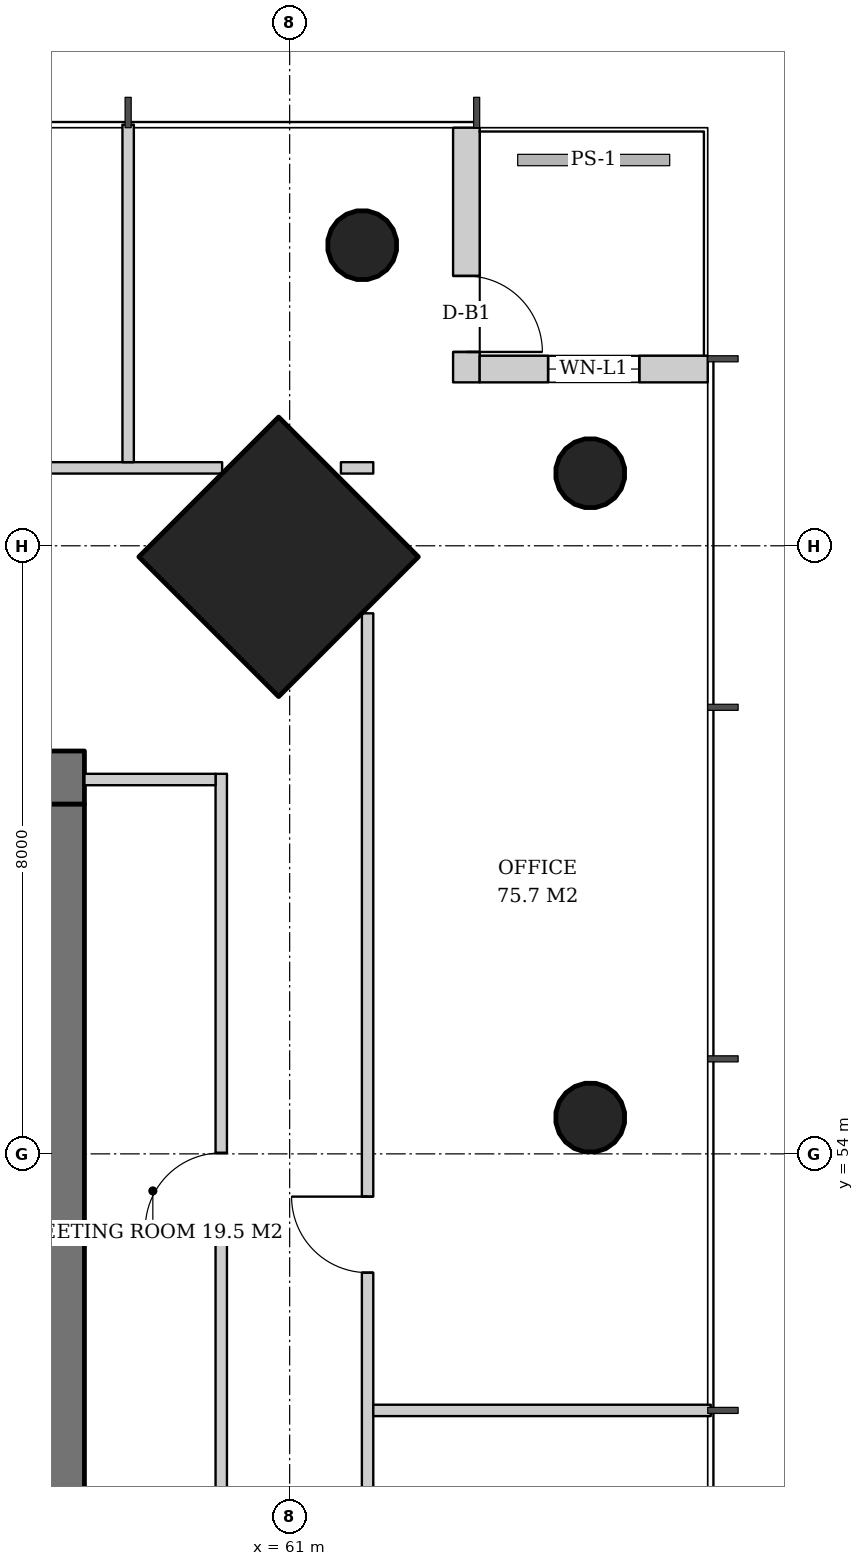
"""IFC4 building model, lengths in metres.
Left out: names, types, materials, properties, quantities, classifications, styles, units other than length and angle.
Written with IfcOpenShell. Run it as: python <this file> out.ifc"""

import sys

from ifc_helpers import new_model, si_unit, direction, frame, frame_2d, origin, origin_2d, place, context, subcontext, project, spatial, rectangle, hollow_circle, extrude, element, fill, save


model = new_model("IFC4")
c1 = context("Model", 3, precision=1e-05, world=origin(), true_north=direction((0.0, 1.0)))
c2 = subcontext(c1, "Body", "Model", "MODEL_VIEW")
j1 = project(units=[si_unit("LENGTHUNIT", "METRE"), si_unit("PLANEANGLEUNIT", "RADIAN")], contexts=[c1])
p1 = place(None, origin())
s1 = spatial("IfcSite", under=j1, at=p1, CompositionType="ELEMENT")
p2 = place(p1, origin())
s2 = spatial("IfcBuilding", under=s1, at=p2, CompositionType="ELEMENT")
p3 = place(p2, frame((0.0, 0.0, 146.4)))
s3 = spatial("IfcBuildingStorey", under=s2, at=p3, CompositionType="ELEMENT", Elevation=146.4)
p4 = place(p3, frame((60.893, 61.893, 0.0), z_axis=(-0.031898107953, -0.031898107953, 0.998981992539), x_axis=(0.707106781187, -0.707106781187, 0.0)))
e1 = element("IfcColumn", 1, at=p4, inside=s3, PredefinedType="COLUMN", context=c2, shape_type="SweptSolid", body=[
    extrude(rectangle(XDim=2.6, YDim=2.6, at=origin_2d()), origin(), (0.0, 0.0, 1.0), 3.804),
])
p5 = place(p3, frame((64.993, 62.993, 0.0), z_axis=(-0.031962158256, -0.031962158256, 0.998977898093), x_axis=(0.707106781187, -0.707106781187, 0.0)))
e2 = element("IfcColumn", 2, at=p5, inside=s3, PredefinedType="COLUMN", context=c2, shape_type="SweptSolid", body=[
    extrude(hollow_circle(Radius=0.457, WallThickness=0.03, at=origin_2d()), origin(), (0.0, 0.0, 1.0), 3.804),
])
p6 = place(p3, frame((64.993, 54.496, 0.0), z_axis=(-0.031974442509, -0.015923015547, 0.999361842679), x_axis=(0.445775033553, -0.895145027055, 0.0)))
e3 = element("IfcColumn", 3, at=p6, inside=s3, PredefinedType="COLUMN", context=c2, shape_type="SweptSolid", body=[
    extrude(hollow_circle(Radius=0.457, WallThickness=0.03, at=origin_2d()), origin(), (0.0, 0.0, 1.0), 3.802),
])
p7 = place(p3, frame((61.993, 65.993, 0.0), z_axis=(-0.031962158256, -0.031962158256, 0.998977898093), x_axis=(0.707106781187, -0.707106781187, 0.0)))
e4 = element("IfcColumn", 4, at=p7, inside=s3, PredefinedType="COLUMN", context=c2, shape_type="SweptSolid", body=[
    extrude(hollow_circle(Radius=0.457, WallThickness=0.03, at=origin_2d()), origin(), (0.0, 0.0, 1.0), 3.804),
])
p8 = place(p3, frame((31.7, 58.95, 0.0), z_axis=(0.0, 0.0, 1.0), x_axis=(1.0, 0.0, 0.0)))
e5 = element("IfcWall", 5, at=p8, inside=s3, PredefinedType="SHEAR", context=c2, shape_type="SweptSolid", body=[
    extrude(rectangle(XDim=26.6, YDim=0.7, at=frame_2d((13.3, 0.0))), origin(), (0.0, 0.0, 1.0), 3.8),
])
p9 = place(p8, frame((17.94, 0.0, 0.0)))
e6 = element("IfcOpeningElement", 6, at=p9, cuts=e5, PredefinedType="OPENING", context=c2, shape_type="SweptSolid", body=[
    extrude(rectangle(XDim=1.0, YDim=2.1, at=frame_2d((0.5, 1.05))), frame((0.0, 0.36, 0.0), z_axis=(0.0, -1.0, 0.0), x_axis=(1.0, 0.0, 0.0)), (0.0, 0.0, 1.0), 0.72),
])
p10 = place(p8, frame((5.825, 0.0, 0.0)))
e7 = element("IfcOpeningElement", 7, at=p10, cuts=e5, PredefinedType="OPENING", context=c2, shape_type="SweptSolid", body=[
    extrude(rectangle(XDim=1.0, YDim=2.1, at=frame_2d((0.5, 1.05))), frame((0.0, 0.36, 0.0), z_axis=(0.0, -1.0, 0.0), x_axis=(1.0, 0.0, 0.0)), (0.0, 0.0, 1.0), 0.72),
])
p11 = place(p8, frame((1.551, 0.0, 0.0)))
e8 = element("IfcOpeningElement", 8, at=p11, cuts=e5, PredefinedType="OPENING", context=c2, shape_type="SweptSolid", body=[
    extrude(rectangle(XDim=1.0, YDim=2.1, at=frame_2d((0.5, 1.05))), frame((0.0, 0.36, 0.0), z_axis=(0.0, -1.0, 0.0), x_axis=(1.0, 0.0, 0.0)), (0.0, 0.0, 1.0), 0.72),
])
p12 = place(p8, frame((3.638, 0.0, 0.0)))
e9 = element("IfcOpeningElement", 9, at=p12, cuts=e5, PredefinedType="OPENING", context=c2, shape_type="SweptSolid", body=[
    extrude(rectangle(XDim=1.0, YDim=2.1, at=frame_2d((0.5, 1.05))), frame((0.0, 0.36, 0.0), z_axis=(0.0, -1.0, 0.0), x_axis=(1.0, 0.0, 0.0)), (0.0, 0.0, 1.0), 0.72),
])
p13 = place(p8, frame((8.342, 0.0, 0.0)))
e10 = element("IfcOpeningElement", 10, at=p13, cuts=e5, PredefinedType="OPENING", context=c2, shape_type="SweptSolid", body=[
    extrude(rectangle(XDim=1.0, YDim=2.1, at=frame_2d((0.5, 1.05))), frame((0.0, 0.36, 0.0), z_axis=(0.0, -1.0, 0.0), x_axis=(1.0, 0.0, 0.0)), (0.0, 0.0, 1.0), 0.72),
])
p14 = place(p8, frame((11.626, 0.0, 0.0)))
e11 = element("IfcOpeningElement", 11, at=p14, cuts=e5, PredefinedType="OPENING", context=c2, shape_type="SweptSolid", body=[
    extrude(rectangle(XDim=1.0, YDim=2.1, at=frame_2d((0.5, 1.05))), frame((0.0, 0.36, 0.0), z_axis=(0.0, -1.0, 0.0), x_axis=(1.0, 0.0, 0.0)), (0.0, 0.0, 1.0), 0.72),
])
p15 = place(p8, frame((14.862, 0.0, 0.0)))
e12 = element("IfcOpeningElement", 12, at=p15, cuts=e5, PredefinedType="OPENING", context=c2, shape_type="SweptSolid", body=[
    extrude(rectangle(XDim=1.0, YDim=2.1, at=frame_2d((0.5, 1.05))), frame((0.0, 0.36, 0.0), z_axis=(0.0, -1.0, 0.0), x_axis=(1.0, 0.0, 0.0)), (0.0, 0.0, 1.0), 0.72),
])
p16 = place(p8, frame((20.9, 0.0, 0.0)))
e13 = element("IfcOpeningElement", 13, at=p16, cuts=e5, PredefinedType="OPENING", context=c2, shape_type="SweptSolid", body=[
    extrude(rectangle(XDim=1.0, YDim=2.1, at=frame_2d((0.5, 1.05))), frame((0.0, 0.36, 0.0), z_axis=(0.0, -1.0, 0.0), x_axis=(1.0, 0.0, 0.0)), (0.0, 0.0, 1.0), 0.72),
])
p17 = place(p8, frame((23.75, 0.0, 0.0)))
e14 = element("IfcOpeningElement", 14, at=p17, cuts=e5, PredefinedType="OPENING", context=c2, shape_type="SweptSolid", body=[
    extrude(rectangle(XDim=1.0, YDim=2.1, at=frame_2d((0.5, 1.05))), frame((0.0, 0.36, 0.0), z_axis=(0.0, -1.0, 0.0), x_axis=(1.0, 0.0, 0.0)), (0.0, 0.0, 1.0), 0.72),
])
p18 = place(p3, frame((57.95, 33.4, 0.0), z_axis=(0.0, 0.0, 1.0), x_axis=(0.0, 1.0, 0.0)))
e15 = element("IfcWall", 15, at=p18, inside=s3, PredefinedType="SHEAR", context=c2, shape_type="SweptSolid", body=[
    extrude(rectangle(XDim=25.2, YDim=0.7, at=frame_2d((12.6, 0.0))), origin(), (0.0, 0.0, 1.0), 3.8),
])
p19 = place(p18, frame((11.7, 0.0, 0.0)))
e16 = element("IfcOpeningElement", 16, at=p19, cuts=e15, PredefinedType="OPENING", context=c2, shape_type="SweptSolid", body=[
    extrude(rectangle(XDim=1.8, YDim=2.4, at=frame_2d((0.9, 1.2))), frame((0.0, 0.36, 0.0), z_axis=(0.0, -1.0, 0.0), x_axis=(1.0, 0.0, 0.0)), (0.0, 0.0, 1.0), 0.72),
])
p20 = place(p3, frame((63.325, 67.5, 0.0), z_axis=(0.0, 0.0, 1.0), x_axis=(0.0, -1.0, 0.0)))
e17 = element("IfcWall", 17, at=p20, inside=s3, PredefinedType="SOLIDWALL", context=c2, shape_type="SweptSolid", body=[
    extrude(rectangle(XDim=3.35, YDim=0.35, at=frame_2d((1.675, 0.0))), origin(), (0.0, 0.0, 1.0), 3.62),
])
p21 = place(p20, frame((1.95, 0.0, 0.0)))
e18 = element("IfcOpeningElement", 18, at=p21, cuts=e17, PredefinedType="OPENING", context=c2, shape_type="SweptSolid", body=[
    extrude(rectangle(XDim=1.0, YDim=2.4, at=frame_2d((0.5, 1.2))), frame((0.0, 0.185, 0.0), z_axis=(0.0, -1.0, 0.0), x_axis=(1.0, 0.0, 0.0)), (0.0, 0.0, 1.0), 0.37),
])
p22 = place(p3, frame((63.5, 64.325, 0.0), z_axis=(0.0, 0.0, 1.0), x_axis=(1.0, 0.0, 0.0)))
e19 = element("IfcWall", 19, at=p22, inside=s3, PredefinedType="SOLIDWALL", context=c2, shape_type="SweptSolid", body=[
    extrude(rectangle(XDim=3.0, YDim=0.35, at=frame_2d((1.5, 0.0))), origin(), (0.0, 0.0, 1.0), 3.62),
])
p23 = place(p22, frame((0.9, 0.0, 0.6)))
e20 = element("IfcOpeningElement", 20, at=p23, cuts=e19, PredefinedType="OPENING", context=c2, shape_type="SweptSolid", body=[
    extrude(rectangle(XDim=1.2, YDim=2.55, at=frame_2d((0.6, 1.275))), frame((0.0, 0.185, 0.0), z_axis=(0.0, -1.0, 0.0), x_axis=(1.0, 0.0, 0.0)), (0.0, 0.0, 1.0), 0.37),
])
p24 = place(p3, frame((60.1, 48.025, 0.0), z_axis=(0.0, 0.0, 1.0), x_axis=(0.0, 1.0, 0.0)))
e21 = element("IfcWall", 21, at=p24, inside=s3, PredefinedType="PARTITIONING", context=c2, shape_type="SweptSolid", body=[
    extrude(rectangle(XDim=10.975, YDim=0.15, at=frame_2d((5.488, 0.0))), origin(), (0.0, 0.0, 1.0), 2.806),
])
p25 = place(p24, frame((4.988, 0.0, 0.0)))
e22 = element("IfcOpeningElement", 22, at=p25, cuts=e21, PredefinedType="OPENING", context=c2, shape_type="SweptSolid", body=[
    extrude(rectangle(XDim=1.0, YDim=2.1, at=frame_2d((0.5, 1.05))), frame((0.0, 0.085, 0.0), z_axis=(0.0, -1.0, 0.0), x_axis=(1.0, 0.0, 0.0)), (0.0, 0.0, 1.0), 0.17),
])
p26 = place(p3, frame((58.3, 58.925, 0.0), z_axis=(0.0, 0.0, 1.0), x_axis=(1.0, 0.0, 0.0)))
e23 = element("IfcWall", 23, at=p26, inside=s3, PredefinedType="PARTITIONING", context=c2, shape_type="SweptSolid", body=[
    extrude(rectangle(XDim=1.725, YDim=0.15, at=frame_2d((0.862, 0.0))), origin(), (0.0, 0.0, 1.0), 3.62),
])
p27 = place(p3, frame((62.025, 30.888, 0.0), z_axis=(0.0, 0.0, 1.0), x_axis=(0.0, 1.0, 0.0)))
e24 = element("IfcWall", 24, at=p27, inside=s3, PredefinedType="PARTITIONING", context=c2, shape_type="SweptSolid", body=[
    extrude(rectangle(XDim=30.223, YDim=0.15, at=frame_2d((15.112, 0.0))), origin(), (0.0, 0.0, 1.0), 2.72),
])
p28 = place(p27, frame((3.049, 0.0, 0.0)))
e25 = element("IfcOpeningElement", 25, at=p28, cuts=e24, PredefinedType="OPENING", context=c2, shape_type="SweptSolid", body=[
    extrude(rectangle(XDim=1.0, YDim=2.1, at=frame_2d((0.5, 1.05))), frame((0.0, 0.085, 0.0), z_axis=(0.0, -1.0, 0.0), x_axis=(1.0, 0.0, 0.0)), (0.0, 0.0, 1.0), 0.17),
])
p29 = place(p27, frame((7.674, 0.0, 0.0)))
e26 = element("IfcOpeningElement", 26, at=p29, cuts=e24, PredefinedType="OPENING", context=c2, shape_type="SweptSolid", body=[
    extrude(rectangle(XDim=1.0, YDim=2.1, at=frame_2d((0.5, 1.05))), frame((0.0, 0.085, 0.0), z_axis=(0.0, -1.0, 0.0), x_axis=(1.0, 0.0, 0.0)), (0.0, 0.0, 1.0), 0.17),
])
p30 = place(p27, frame((12.299, 0.0, 0.0)))
e27 = element("IfcOpeningElement", 27, at=p30, cuts=e24, PredefinedType="OPENING", context=c2, shape_type="SweptSolid", body=[
    extrude(rectangle(XDim=1.0, YDim=2.1, at=frame_2d((0.5, 1.05))), frame((0.0, 0.085, 0.0), z_axis=(0.0, -1.0, 0.0), x_axis=(1.0, 0.0, 0.0)), (0.0, 0.0, 1.0), 0.17),
])
p31 = place(p27, frame((16.924, 0.0, 0.0)))
e28 = element("IfcOpeningElement", 28, at=p31, cuts=e24, PredefinedType="OPENING", context=c2, shape_type="SweptSolid", body=[
    extrude(rectangle(XDim=1.0, YDim=2.1, at=frame_2d((0.5, 1.05))), frame((0.0, 0.085, 0.0), z_axis=(0.0, -1.0, 0.0), x_axis=(1.0, 0.0, 0.0)), (0.0, 0.0, 1.0), 0.17),
])
p32 = place(p27, frame((21.549, 0.0, 0.0)))
e29 = element("IfcOpeningElement", 29, at=p32, cuts=e24, PredefinedType="OPENING", context=c2, shape_type="SweptSolid", body=[
    extrude(rectangle(XDim=1.0, YDim=2.1, at=frame_2d((0.5, 1.05))), frame((0.0, 0.085, 0.0), z_axis=(0.0, -1.0, 0.0), x_axis=(1.0, 0.0, 0.0)), (0.0, 0.0, 1.0), 0.17),
])
p33 = place(p3, frame((62.1, 50.625, 0.0), z_axis=(0.0, 0.0, 1.0), x_axis=(1.0, 0.0, 0.0)))
e30 = element("IfcWall", 30, at=p33, inside=s3, PredefinedType="PARTITIONING", context=c2, shape_type="SweptSolid", body=[
    extrude(rectangle(XDim=4.44, YDim=0.15, at=frame_2d((2.22, 0.0))), origin(), (0.0, 0.0, 1.0), 2.82),
])
p34 = place(p3, frame((62.1, 63.025, 0.0), z_axis=(0.0, 0.0, 1.0), x_axis=(-1.0, 0.0, 0.0)))
e31 = element("IfcWall", 31, at=p34, inside=s3, PredefinedType="PARTITIONING", context=c2, shape_type="SweptSolid", body=[
    extrude(rectangle(XDim=0.426, YDim=0.15, at=frame_2d((0.213, 0.0))), origin(), (0.0, 0.0, 1.0), 3.32),
])
p35 = place(p3, frame((60.112, 63.025, 0.0), z_axis=(0.0, 0.0, 1.0), x_axis=(-1.0, 0.0, 0.0)))
e32 = element("IfcWall", 32, at=p35, inside=s3, PredefinedType="PARTITIONING", context=c2, shape_type="SweptSolid", body=[
    extrude(rectangle(XDim=30.223, YDim=0.15, at=frame_2d((15.112, 0.0))), origin(), (0.0, 0.0, 1.0), 2.72),
])
p36 = place(p35, frame((3.049, 0.0, 0.0)))
e33 = element("IfcOpeningElement", 33, at=p36, cuts=e32, PredefinedType="OPENING", context=c2, shape_type="SweptSolid", body=[
    extrude(rectangle(XDim=1.0, YDim=2.1, at=frame_2d((0.5, 1.05))), frame((0.0, 0.085, 0.0), z_axis=(0.0, -1.0, 0.0), x_axis=(1.0, 0.0, 0.0)), (0.0, 0.0, 1.0), 0.17),
])
p37 = place(p35, frame((7.674, 0.0, 0.0)))
e34 = element("IfcOpeningElement", 34, at=p37, cuts=e32, PredefinedType="OPENING", context=c2, shape_type="SweptSolid", body=[
    extrude(rectangle(XDim=1.0, YDim=2.1, at=frame_2d((0.5, 1.05))), frame((0.0, 0.085, 0.0), z_axis=(0.0, -1.0, 0.0), x_axis=(1.0, 0.0, 0.0)), (0.0, 0.0, 1.0), 0.17),
])
p38 = place(p35, frame((16.924, 0.0, 0.0)))
e35 = element("IfcOpeningElement", 35, at=p38, cuts=e32, PredefinedType="OPENING", context=c2, shape_type="SweptSolid", body=[
    extrude(rectangle(XDim=1.0, YDim=2.1, at=frame_2d((0.5, 1.05))), frame((0.0, 0.085, 0.0), z_axis=(0.0, -1.0, 0.0), x_axis=(1.0, 0.0, 0.0)), (0.0, 0.0, 1.0), 0.17),
])
p39 = place(p35, frame((26.174, 0.0, 0.0)))
e36 = element("IfcOpeningElement", 36, at=p39, cuts=e32, PredefinedType="OPENING", context=c2, shape_type="SweptSolid", body=[
    extrude(rectangle(XDim=1.0, YDim=2.1, at=frame_2d((0.5, 1.05))), frame((0.0, 0.085, 0.0), z_axis=(0.0, -1.0, 0.0), x_axis=(1.0, 0.0, 0.0)), (0.0, 0.0, 1.0), 0.17),
])
p40 = place(p3, frame((58.875, 63.1, 0.0), z_axis=(0.0, 0.0, 1.0), x_axis=(0.0, 1.0, 0.0)))
e37 = element("IfcWall", 37, at=p40, inside=s3, PredefinedType="PARTITIONING", context=c2, shape_type="SweptSolid", body=[
    extrude(rectangle(XDim=4.44, YDim=0.15, at=frame_2d((2.22, 0.0))), origin(), (0.0, 0.0, 1.0), 2.82),
])
p41 = place(p21, origin())
e38 = element("IfcDoor", 38, at=p41, inside=s3, OperationType="SINGLE_SWING_RIGHT", PredefinedType="DOOR", context=c2, shape_type="SweptSolid", body=[
    extrude(rectangle(XDim=1.0, YDim=2.4, at=frame_2d((0.5, 1.2))), frame((0.0, 0.025, 0.0), z_axis=(0.0, -1.0, 0.0), x_axis=(1.0, 0.0, 0.0)), (0.0, 0.0, 1.0), 0.05),
])
fill(e18, e38)
p42 = place(p23, origin())
e39 = element("IfcWindow", 39, at=p42, inside=s3, PartitioningType="SINGLE_PANEL", PredefinedType="WINDOW", context=c2, shape_type="SweptSolid", body=[
    extrude(rectangle(XDim=1.2, YDim=2.55, at=frame_2d((0.6, 1.275))), frame((0.0, 0.03, 0.0), z_axis=(0.0, -1.0, 0.0), x_axis=(1.0, 0.0, 0.0)), (0.0, 0.0, 1.0), 0.06),
])
fill(e20, e39)
p43 = place(p25, origin())
e40 = element("IfcDoor", 40, at=p43, inside=s3, OperationType="SINGLE_SWING_LEFT", PredefinedType="DOOR", context=c2, shape_type="SweptSolid", body=[
    extrude(rectangle(XDim=1.0, YDim=2.1, at=frame_2d((0.5, 1.05))), frame((0.0, 0.025, 0.0), z_axis=(0.0, -1.0, 0.0), x_axis=(1.0, 0.0, 0.0)), (0.0, 0.0, 1.0), 0.05),
])
fill(e22, e40)
p44 = place(p32, origin())
e41 = element("IfcDoor", 41, at=p44, inside=s3, OperationType="SINGLE_SWING_RIGHT", PredefinedType="DOOR", context=c2, shape_type="SweptSolid", body=[
    extrude(rectangle(XDim=1.0, YDim=2.1, at=frame_2d((0.5, 1.05))), frame((0.0, 0.025, 0.0), z_axis=(0.0, -1.0, 0.0), x_axis=(1.0, 0.0, 0.0)), (0.0, 0.0, 1.0), 0.05),
])
fill(e29, e41)
save(model, sys.argv[1])
